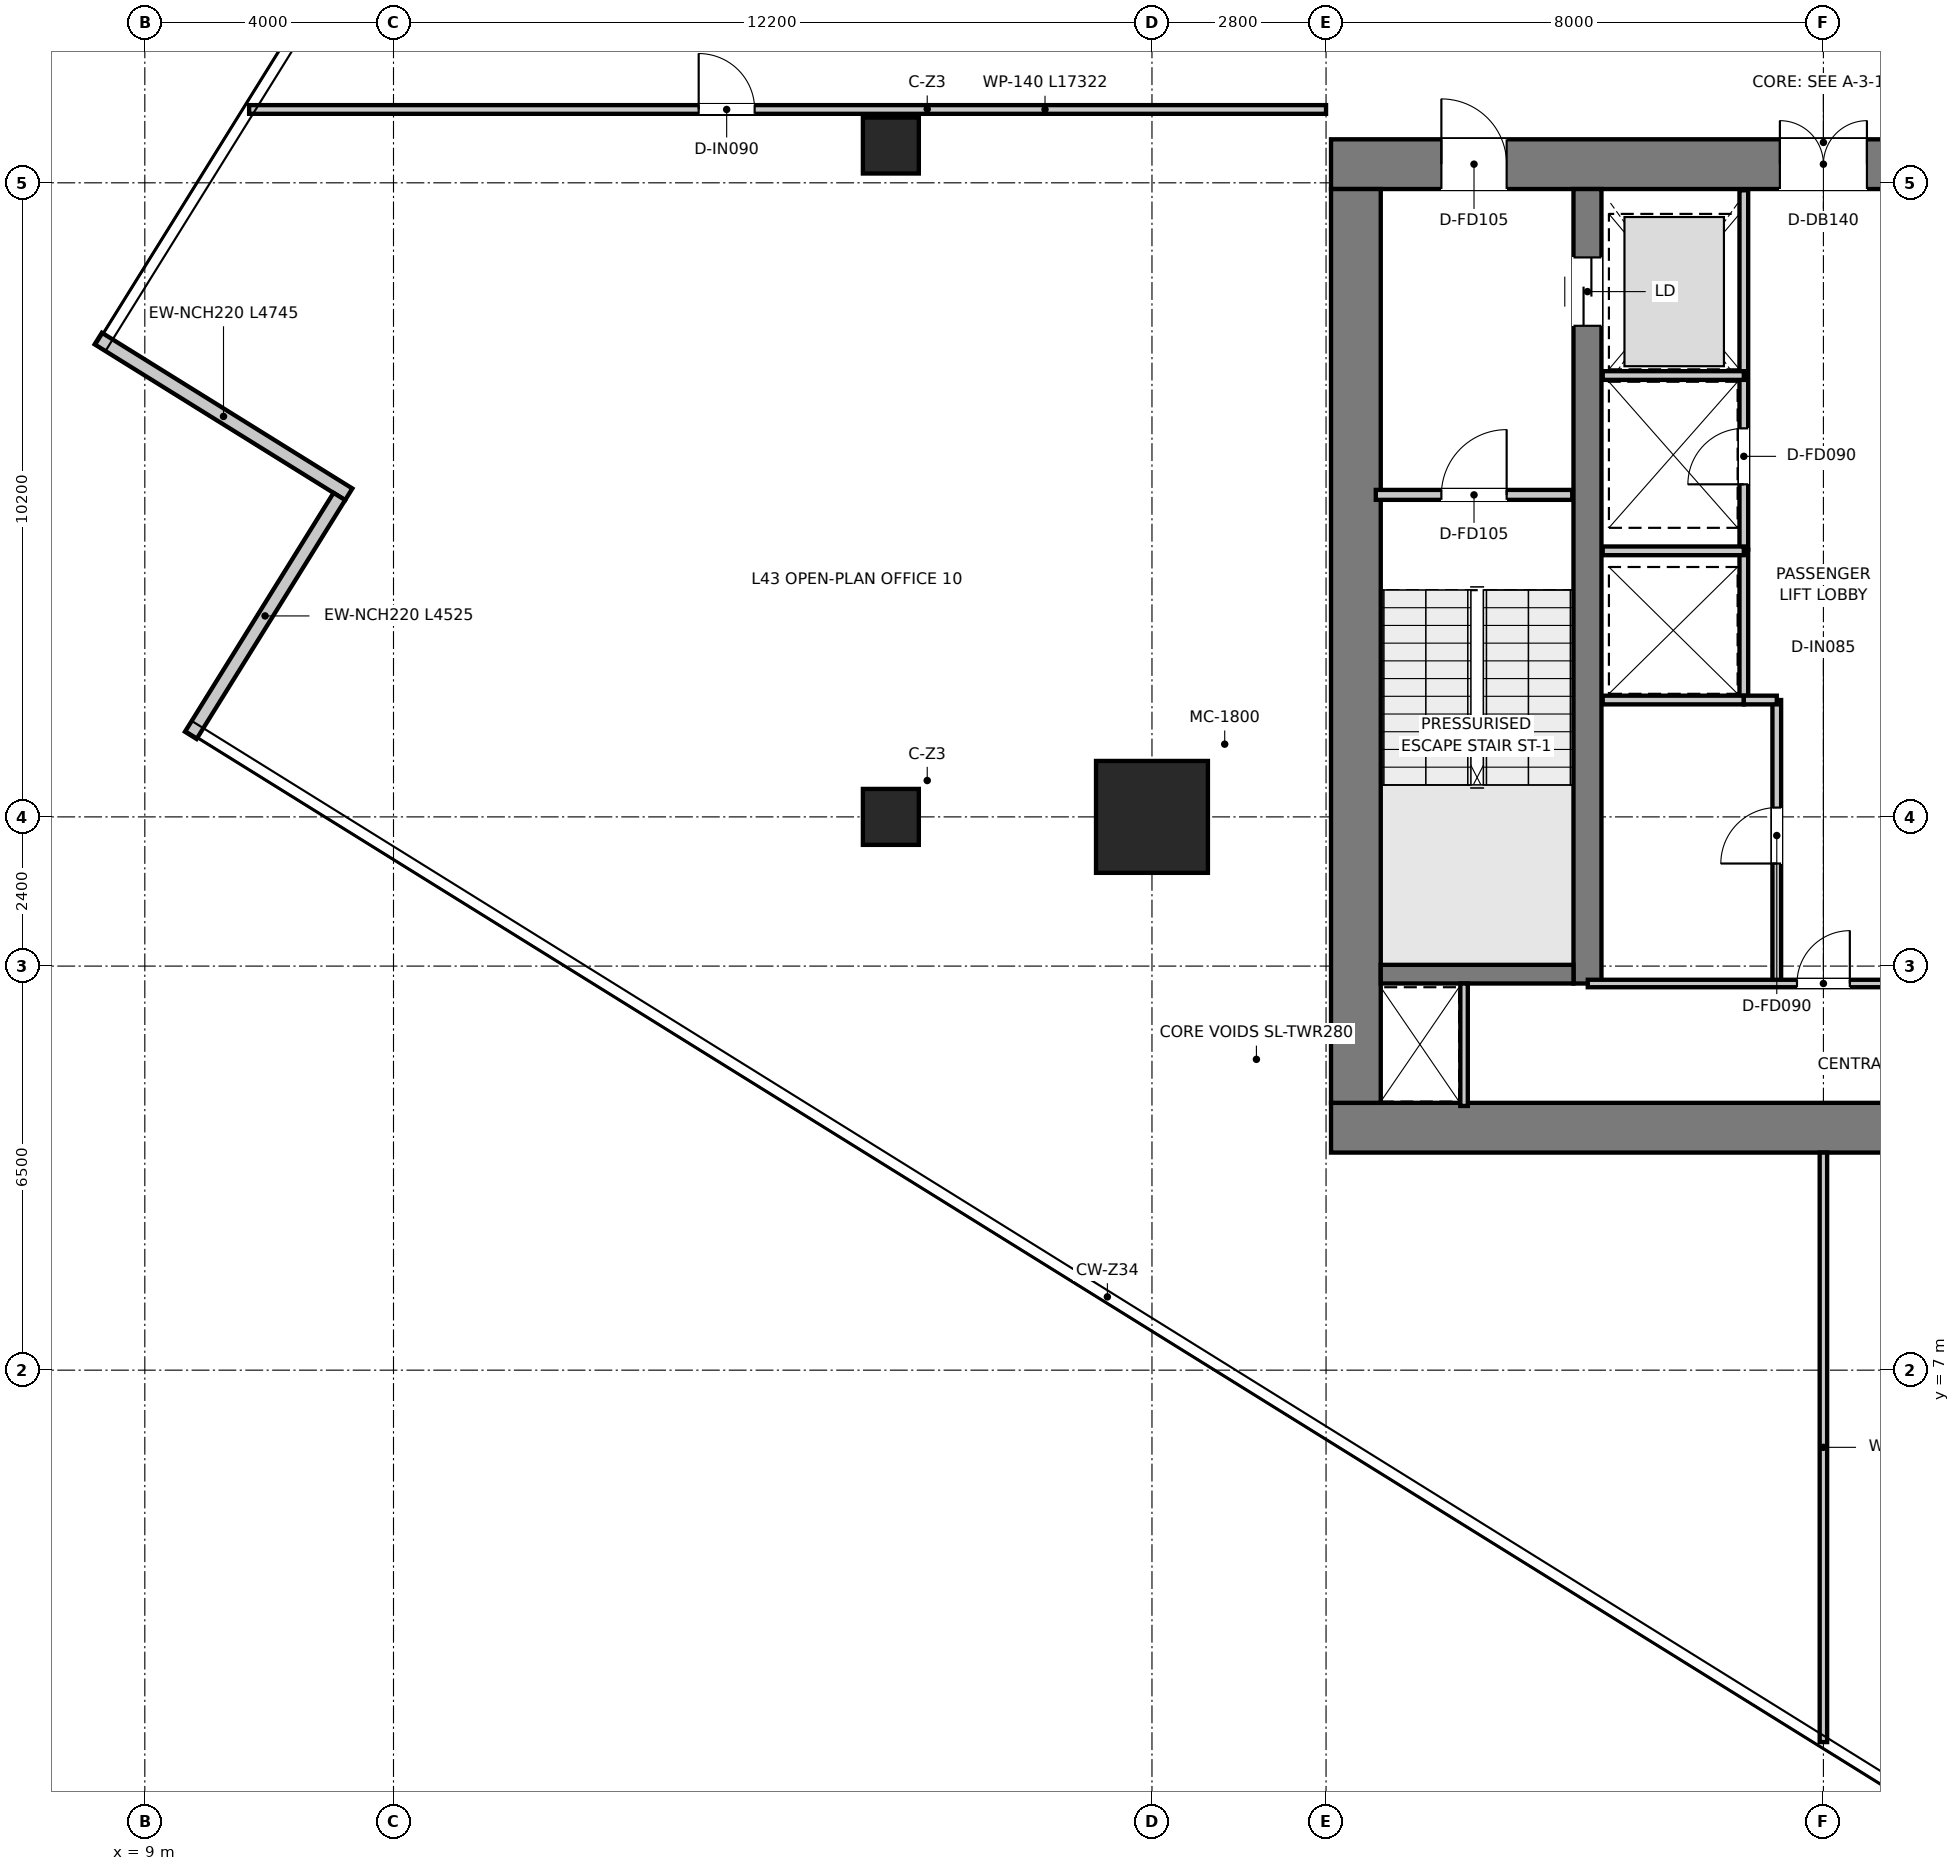
"""IFC4 building model, lengths in metres.
Left out: names, types, materials, properties, quantities, classifications, styles, units other than length and angle.
Written with IfcOpenShell. Run it as: python <this file> out.ifc"""

import sys

from ifc_helpers import new_model, si_unit, direction, frame, frame_2d, origin, origin_2d, place, context, subcontext, project, spatial, rectangle, extrude, source, transform, mapped, element, fill, save


model = new_model("IFC4")
c1 = context("Model", 3, precision=1e-05, world=origin(), true_north=direction((0.0, 1.0)))
c2 = subcontext(c1, "Body", "Model", "MODEL_VIEW")
j1 = project(units=[si_unit("LENGTHUNIT", "METRE"), si_unit("PLANEANGLEUNIT", "RADIAN")], contexts=[c1])
p1 = place(None, origin())
s1 = spatial("IfcSite", under=j1, at=p1, CompositionType="ELEMENT")
p2 = place(p1, origin())
s2 = spatial("IfcBuilding", under=s1, at=p2, CompositionType="ELEMENT")
p3 = place(p2, frame((0.0, 0.0, 177.8)))
s3 = spatial("IfcBuildingStorey", under=s2, at=p3, CompositionType="ELEMENT", Elevation=177.8)
p4 = place(p3, frame((28.08, 10.9, 0.0), z_axis=(0.0, 0.0, 1.0), x_axis=(1.0, 0.0, 0.0)))
e1 = element("IfcWall", 1, at=p4, inside=s3, PredefinedType="SHEAR", context=c2, shape_type="SweptSolid", body=[
    extrude(rectangle(XDim=15.84, YDim=0.8, at=frame_2d((7.92, 0.0))), origin(), (0.0, 0.0, 1.0), 3.95),
])
p5 = place(p3, frame((28.08, 26.4, 0.0), z_axis=(0.0, 0.0, 1.0), x_axis=(1.0, 0.0, 0.0)))
e2 = element("IfcWall", 2, at=p5, inside=s3, PredefinedType="SHEAR", context=c2, shape_type="SweptSolid", body=[
    extrude(rectangle(XDim=15.84, YDim=0.8, at=frame_2d((7.92, 0.0))), origin(), (0.0, 0.0, 1.0), 3.95),
])
p6 = place(p5, frame((7.22, 0.0, 0.0)))
e3 = element("IfcOpeningElement", 3, at=p6, cuts=e2, PredefinedType="OPENING", context=c2, shape_type="SweptSolid", body=[
    extrude(rectangle(XDim=1.4, YDim=2.2, at=frame_2d((0.7, 1.1))), frame((0.0, 0.41, 0.0), z_axis=(0.0, -1.0, 0.0), x_axis=(1.0, 0.0, 0.0)), (0.0, 0.0, 1.0), 0.82),
])
p7 = place(p5, frame((1.775, 0.0, 0.0)))
e4 = element("IfcOpeningElement", 4, at=p7, cuts=e2, PredefinedType="OPENING", context=c2, shape_type="SweptSolid", body=[
    extrude(rectangle(XDim=1.05, YDim=2.1, at=frame_2d((0.525, 1.05))), frame((0.0, 0.41, 0.0), z_axis=(0.0, -1.0, 0.0), x_axis=(1.0, 0.0, 0.0)), (0.0, 0.0, 1.0), 0.82),
])
p8 = place(p5, frame((13.015, 0.0, 0.0)))
e5 = element("IfcOpeningElement", 5, at=p8, cuts=e2, PredefinedType="OPENING", context=c2, shape_type="SweptSolid", body=[
    extrude(rectangle(XDim=1.05, YDim=2.1, at=frame_2d((0.525, 1.05))), frame((0.0, 0.41, 0.0), z_axis=(0.0, -1.0, 0.0), x_axis=(1.0, 0.0, 0.0)), (0.0, 0.0, 1.0), 0.82),
])
p9 = place(p3, frame((28.48, 11.3, 0.0), z_axis=(0.0, 0.0, 1.0), x_axis=(0.0, 1.0, 0.0)))
e6 = element("IfcWall", 6, at=p9, inside=s3, PredefinedType="SHEAR", context=c2, shape_type="SweptSolid", body=[
    extrude(rectangle(XDim=14.7, YDim=0.8, at=frame_2d((7.35, 0.0))), origin(), (0.0, 0.0, 1.0), 3.95),
])
p10 = place(p3, frame((32.205, 13.22, 0.0), z_axis=(0.0, 0.0, 1.0), x_axis=(0.0, 1.0, 0.0)))
e7 = element("IfcWall", 7, at=p10, inside=s3, PredefinedType="SHEAR", context=c2, shape_type="SweptSolid", body=[
    extrude(rectangle(XDim=12.78, YDim=0.45, at=frame_2d((6.39, 0.0))), origin(), (0.0, 0.0, 1.0), 3.95),
])
p11 = place(p10, frame((10.58, 0.0, 0.0)))
e8 = element("IfcOpeningElement", 8, at=p11, cuts=e7, PredefinedType="OPENING", context=c2, shape_type="SweptSolid", body=[
    extrude(rectangle(XDim=1.1, YDim=2.15, at=frame_2d((0.55, 1.075))), frame((0.0, 0.235, 0.0), z_axis=(0.0, -1.0, 0.0), x_axis=(1.0, 0.0, 0.0)), (0.0, 0.0, 1.0), 0.47),
])
p12 = place(p3, frame((28.88, 13.37, 0.0), z_axis=(0.0, 0.0, 1.0), x_axis=(1.0, 0.0, 0.0)))
e9 = element("IfcWall", 9, at=p12, inside=s3, PredefinedType="SHEAR", context=c2, shape_type="SweptSolid", body=[
    extrude(rectangle(XDim=3.1, YDim=0.3, at=frame_2d((1.55, 0.0))), origin(), (0.0, 0.0, 1.0), 3.95),
])
m1 = source(origin(), c2, "Body", "SweptSolid", [
    extrude(rectangle(XDim=1.8, YDim=1.8, at=origin_2d()), origin(), (0.0, 0.0, 1.0), 3.95),
])
p13 = place(p3, frame((25.2, 15.9, 0.0), z_axis=(0.0, 0.0, 1.0), x_axis=(1.0, 0.0, 0.0)))
e10 = element("IfcColumn", 10, at=p13, inside=s3, PredefinedType="USERDEFINED", context=c2, shape_type="MappedRepresentation", body=[
    mapped(m1, transform((0.0, 0.0, 0.0), x_axis=(1.0, 0.0, 0.0), y_axis=(0.0, 1.0, 0.0), z_axis=(0.0, 0.0, 1.0), scale=1.0)),
])
m2 = source(origin(), c2, "Body", "SweptSolid", [
    extrude(rectangle(XDim=0.9, YDim=0.9, at=origin_2d()), origin(), (0.0, 0.0, 1.0), 3.95),
])
for number, where, z_axis, x_axis in (
    (11, (21.0, 15.9, 0.0), (0.0, 0.0, 1.0), (1.0, 0.0, 0.0)),
    (12, (21.0, 26.7, 0.0), (0.0, 0.0, 1.0), (1.0, 0.0, 0.0)),
):
    element("IfcColumn", number, at=place(p3, frame(where, z_axis=z_axis, x_axis=x_axis)), inside=s3, PredefinedType="COLUMN", context=c2, shape_type="MappedRepresentation", body=[
        mapped(m2, transform((0.0, 0.0, 0.0), x_axis=(1.0, 0.0, 0.0), y_axis=(0.0, 1.0, 0.0), z_axis=(0.0, 0.0, 1.0), scale=1.0)),
    ])
p14 = place(p3, frame((8.251, 23.595, 0.0), z_axis=(0.0, 0.0, 1.0), x_axis=(0.84921299194, -0.528050465694, 0.0)))
e13 = element("IfcWall", 13, at=p14, inside=s3, PredefinedType="ELEMENTEDWALL", context=c2, shape_type="SweptSolid", body=[
    extrude(rectangle(XDim=4.745, YDim=0.22, at=frame_2d((2.373, 0.0))), origin(), (0.0, 0.0, 1.0), 3.67),
])
p15 = place(p3, frame((12.129, 21.054, 0.0), z_axis=(0.0, 0.0, 1.0), x_axis=(-0.528038242514, -0.849220592333, 0.0)))
e14 = element("IfcWall", 14, at=p15, inside=s3, PredefinedType="ELEMENTEDWALL", context=c2, shape_type="SweptSolid", body=[
    extrude(rectangle(XDim=4.525, YDim=0.22, at=frame_2d((2.263, 0.0))), origin(), (0.0, 0.0, 1.0), 3.67),
])
p16 = place(p3, frame((28.8, 21.08, 0.0), z_axis=(0.0, 0.0, 1.0), x_axis=(1.0, 0.0, 0.0)))
e15 = element("IfcWall", 15, at=p16, inside=s3, PredefinedType="PARTITIONING", context=c2, shape_type="SweptSolid", body=[
    extrude(rectangle(XDim=3.16, YDim=0.16, at=frame_2d((1.58, 0.0))), origin(), (0.0, 0.0, 1.0), 3.67),
])
p17 = place(p16, frame((1.055, 0.0, 0.0)))
e16 = element("IfcOpeningElement", 16, at=p17, cuts=e15, PredefinedType="OPENING", context=c2, shape_type="SweptSolid", body=[
    extrude(rectangle(XDim=1.05, YDim=2.1, at=frame_2d((0.525, 1.05))), frame((0.0, 0.09, 0.0), z_axis=(0.0, -1.0, 0.0), x_axis=(1.0, 0.0, 0.0)), (0.0, 0.0, 1.0), 0.18),
])
p18 = place(p3, frame((34.72, 20.2, 0.0), z_axis=(0.0, 0.0, 1.0), x_axis=(0.0, 1.0, 0.0)))
e17 = element("IfcWall", 17, at=p18, inside=s3, PredefinedType="PARTITIONING", context=c2, shape_type="SweptSolid", body=[
    extrude(rectangle(XDim=5.78, YDim=0.14, at=frame_2d((2.89, 0.0))), origin(), (0.0, 0.0, 1.0), 2.67),
])
p19 = place(p18, frame((1.05, 0.0, 0.0)))
e18 = element("IfcOpeningElement", 18, at=p19, cuts=e17, PredefinedType="OPENING", context=c2, shape_type="SweptSolid", body=[
    extrude(rectangle(XDim=0.9, YDim=2.1, at=frame_2d((0.45, 1.05))), frame((0.0, 0.08, 0.0), z_axis=(0.0, -1.0, 0.0), x_axis=(1.0, 0.0, 0.0)), (0.0, 0.0, 1.0), 0.16),
])
p20 = place(p3, frame((32.45, 23.0, 0.0), z_axis=(0.0, 0.0, 1.0), x_axis=(1.0, 0.0, 0.0)))
e19 = element("IfcWall", 19, at=p20, inside=s3, PredefinedType="PARTITIONING", context=c2, shape_type="SweptSolid", body=[
    extrude(rectangle(XDim=2.27, YDim=0.14, at=frame_2d((1.135, 0.0))), origin(), (0.0, 0.0, 1.0), 2.67),
])
p21 = place(p3, frame((34.72, 17.78, 0.0), z_axis=(0.0, 0.0, 1.0), x_axis=(0.0, 1.0, 0.0)))
e20 = element("IfcWall", 20, at=p21, inside=s3, PredefinedType="PARTITIONING", context=c2, shape_type="SweptSolid", body=[
    extrude(rectangle(XDim=2.42, YDim=0.14, at=frame_2d((1.21, 0.0))), origin(), (0.0, 0.0, 1.0), 3.67),
])
for number, where, z_axis, x_axis in (
    (21, (32.45, 17.78, 0.0), (0.0, 0.0, 1.0), (1.0, 0.0, 0.0)),
    (22, (32.45, 20.18, 0.0), (0.0, 0.0, 1.0), (1.0, 0.0, 0.0)),
):
    element("IfcWall", number, at=place(p3, frame(where, z_axis=z_axis, x_axis=x_axis)), inside=s3, PredefinedType="PARTITIONING", context=c2, shape_type="SweptSolid", body=[
        extrude(rectangle(XDim=2.27, YDim=0.14, at=frame_2d((1.135, 0.0))), origin(), (0.0, 0.0, 1.0), 3.67),
    ])
p22 = place(p3, frame((35.25, 13.22, 0.0), z_axis=(0.0, 0.0, 1.0), x_axis=(0.0, 1.0, 0.0)))
e23 = element("IfcWall", 23, at=p22, inside=s3, PredefinedType="PARTITIONING", context=c2, shape_type="SweptSolid", body=[
    extrude(rectangle(XDim=4.56, YDim=0.14, at=frame_2d((2.28, 0.0))), origin(), (0.0, 0.0, 1.0), 3.67),
])
p23 = place(p22, frame((1.93, 0.0, 0.0)))
e24 = element("IfcOpeningElement", 24, at=p23, cuts=e23, PredefinedType="OPENING", context=c2, shape_type="SweptSolid", body=[
    extrude(rectangle(XDim=0.9, YDim=2.1, at=frame_2d((0.45, 1.05))), frame((0.0, 0.08, 0.0), z_axis=(0.0, -1.0, 0.0), x_axis=(1.0, 0.0, 0.0)), (0.0, 0.0, 1.0), 0.16),
])
p24 = place(p3, frame((34.72, 17.78, 0.0), z_axis=(0.0, 0.0, 1.0), x_axis=(1.0, 0.0, 0.0)))
e25 = element("IfcWall", 25, at=p24, inside=s3, PredefinedType="PARTITIONING", context=c2, shape_type="SweptSolid", body=[
    extrude(rectangle(XDim=0.53, YDim=0.14, at=frame_2d((0.265, 0.0))), origin(), (0.0, 0.0, 1.0), 3.67),
])
p25 = place(p3, frame((30.22, 11.25, 0.0), z_axis=(0.0, 0.0, 1.0), x_axis=(0.0, 1.0, 0.0)))
e26 = element("IfcWall", 26, at=p25, inside=s3, PredefinedType="PARTITIONING", context=c2, shape_type="SweptSolid", body=[
    extrude(rectangle(XDim=1.97, YDim=0.12, at=frame_2d((0.985, 0.0))), origin(), (0.0, 0.0, 1.0), 3.67),
])
p26 = place(p3, frame((32.21, 13.22, 0.0), z_axis=(0.0, 0.0, 1.0), x_axis=(1.0, 0.0, 0.0)))
e27 = element("IfcWall", 27, at=p26, inside=s3, PredefinedType="PARTITIONING", context=c2, shape_type="SweptSolid", body=[
    extrude(rectangle(XDim=7.58, YDim=0.12, at=frame_2d((3.79, 0.0))), origin(), (0.0, 0.0, 1.0), 3.67),
])
p27 = place(p26, frame((3.365, 0.0, 0.0)))
e28 = element("IfcOpeningElement", 28, at=p27, cuts=e27, PredefinedType="OPENING", context=c2, shape_type="SweptSolid", body=[
    extrude(rectangle(XDim=0.85, YDim=2.1, at=frame_2d((0.425, 1.05))), frame((0.0, 0.07, 0.0), z_axis=(0.0, -1.0, 0.0), x_axis=(1.0, 0.0, 0.0)), (0.0, 0.0, 1.0), 0.14),
])
p28 = place(p3, frame((10.678, 27.28, 0.0), z_axis=(0.0, 0.0, 1.0), x_axis=(1.0, 0.0, 0.0)))
e29 = element("IfcWall", 29, at=p28, inside=s3, PredefinedType="PARTITIONING", context=c2, shape_type="SweptSolid", body=[
    extrude(rectangle(XDim=17.322, YDim=0.14, at=frame_2d((8.661, 0.0))), origin(), (0.0, 0.0, 1.0), 3.03),
])
p29 = place(p28, frame((7.231, 0.0, 0.0)))
e30 = element("IfcOpeningElement", 30, at=p29, cuts=e29, PredefinedType="OPENING", context=c2, shape_type="SweptSolid", body=[
    extrude(rectangle(XDim=0.9, YDim=2.1, at=frame_2d((0.45, 1.05))), frame((0.0, 0.08, 0.0), z_axis=(0.0, -1.0, 0.0), x_axis=(1.0, 0.0, 0.0)), (0.0, 0.0, 1.0), 0.16),
])
p30 = place(p3, frame((36.0, 1.017, 0.0), z_axis=(0.0, 0.0, 1.0), x_axis=(0.0, 1.0, 0.0)))
e31 = element("IfcWall", 31, at=p30, inside=s3, PredefinedType="PARTITIONING", context=c2, shape_type="SweptSolid", body=[
    extrude(rectangle(XDim=9.483, YDim=0.12, at=frame_2d((4.741, 0.0))), origin(), (0.0, 0.0, 1.0), 3.67),
])
p31 = place(p17, origin())
e32 = element("IfcDoor", 32, at=p31, inside=s3, OperationType="SINGLE_SWING_RIGHT", PredefinedType="DOOR", context=c2, shape_type="SweptSolid", body=[
    extrude(rectangle(XDim=1.05, YDim=2.1, at=frame_2d((0.525, 1.05))), frame((0.0, 0.025, 0.0), z_axis=(0.0, -1.0, 0.0), x_axis=(1.0, 0.0, 0.0)), (0.0, 0.0, 1.0), 0.05),
])
fill(e16, e32)
p32 = place(p6, origin())
e33 = element("IfcDoor", 33, at=p32, inside=s3, OperationType="DOUBLE_DOOR_SINGLE_SWING", PredefinedType="DOOR", context=c2, shape_type="SweptSolid", body=[
    extrude(rectangle(XDim=1.4, YDim=2.2, at=frame_2d((0.7, 1.1))), frame((0.0, 0.025, 0.0), z_axis=(0.0, -1.0, 0.0), x_axis=(1.0, 0.0, 0.0)), (0.0, 0.0, 1.0), 0.05),
])
fill(e3, e33)
p33 = place(p7, origin())
e34 = element("IfcDoor", 34, at=p33, inside=s3, OperationType="SINGLE_SWING_LEFT", PredefinedType="DOOR", context=c2, shape_type="SweptSolid", body=[
    extrude(rectangle(XDim=1.05, YDim=2.1, at=frame_2d((0.525, 1.05))), frame((0.0, 0.025, 0.0), z_axis=(0.0, -1.0, 0.0), x_axis=(1.0, 0.0, 0.0)), (0.0, 0.0, 1.0), 0.05),
])
fill(e4, e34)
p34 = place(p11, origin())
e35 = element("IfcDoor", 35, at=p34, inside=s3, OperationType="DOUBLE_DOOR_SLIDING", PredefinedType="DOOR", context=c2, shape_type="SweptSolid", body=[
    extrude(rectangle(XDim=1.1, YDim=2.15, at=frame_2d((0.55, 1.075))), frame((0.0, 0.025, 0.0), z_axis=(0.0, -1.0, 0.0), x_axis=(1.0, 0.0, 0.0)), (0.0, 0.0, 1.0), 0.05),
])
fill(e8, e35)
p35 = place(p19, origin())
e36 = element("IfcDoor", 36, at=p35, inside=s3, OperationType="SINGLE_SWING_LEFT", PredefinedType="DOOR", context=c2, shape_type="SweptSolid", body=[
    extrude(rectangle(XDim=0.9, YDim=2.1, at=frame_2d((0.45, 1.05))), frame((0.0, 0.025, 0.0), z_axis=(0.0, -1.0, 0.0), x_axis=(1.0, 0.0, 0.0)), (0.0, 0.0, 1.0), 0.05),
])
fill(e18, e36)
p36 = place(p23, origin())
e37 = element("IfcDoor", 37, at=p36, inside=s3, OperationType="SINGLE_SWING_LEFT", PredefinedType="DOOR", context=c2, shape_type="SweptSolid", body=[
    extrude(rectangle(XDim=0.9, YDim=2.1, at=frame_2d((0.45, 1.05))), frame((0.0, 0.025, 0.0), z_axis=(0.0, -1.0, 0.0), x_axis=(1.0, 0.0, 0.0)), (0.0, 0.0, 1.0), 0.05),
])
fill(e24, e37)
p37 = place(p27, origin())
e38 = element("IfcDoor", 38, at=p37, inside=s3, OperationType="SINGLE_SWING_RIGHT", PredefinedType="DOOR", context=c2, shape_type="SweptSolid", body=[
    extrude(rectangle(XDim=0.85, YDim=2.1, at=frame_2d((0.425, 1.05))), frame((0.0, 0.025, 0.0), z_axis=(0.0, -1.0, 0.0), x_axis=(1.0, 0.0, 0.0)), (0.0, 0.0, 1.0), 0.05),
])
fill(e28, e38)
p38 = place(p29, origin())
e39 = element("IfcDoor", 39, at=p38, inside=s3, OperationType="SINGLE_SWING_LEFT", PredefinedType="DOOR", context=c2, shape_type="SweptSolid", body=[
    extrude(rectangle(XDim=0.9, YDim=2.1, at=frame_2d((0.45, 1.05))), frame((0.0, 0.025, 0.0), z_axis=(0.0, -1.0, 0.0), x_axis=(1.0, 0.0, 0.0)), (0.0, 0.0, 1.0), 0.05),
])
fill(e30, e39)
save(model, sys.argv[1])
